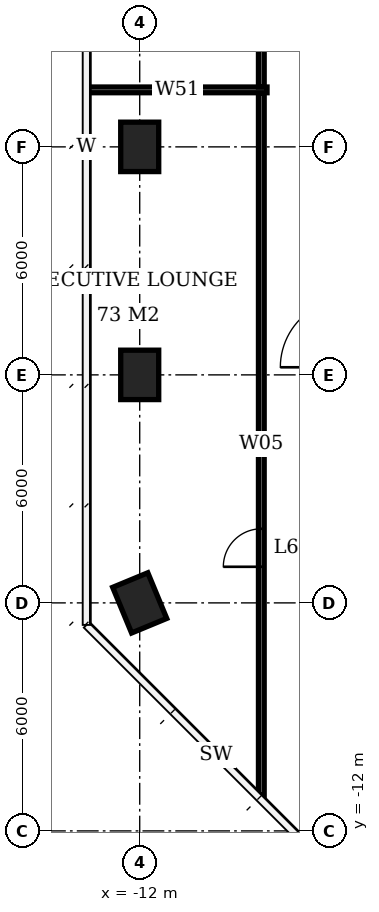
"""IFC4 building model, lengths in metres.
Left out: names, types, materials, properties, quantities, classifications, styles, units other than length and angle.
Written with IfcOpenShell. Run it as: python <this file> out.ifc"""

import sys

from ifc_helpers import new_model, si_unit, direction, frame, frame_2d, origin, origin_2d, place, context, subcontext, project, spatial, rectangle, extrude, element, fill, save


model = new_model("IFC4")
c1 = context("Model", 3, precision=1e-05, world=origin(), true_north=direction((0.0, 1.0)))
c2 = subcontext(c1, "Body", "Model", "MODEL_VIEW")
j1 = project(units=[si_unit("LENGTHUNIT", "METRE"), si_unit("PLANEANGLEUNIT", "RADIAN")], contexts=[c1])
p1 = place(None, origin())
s1 = spatial("IfcSite", under=j1, at=p1, CompositionType="ELEMENT")
p2 = place(p1, origin())
s2 = spatial("IfcBuilding", under=s1, at=p2, CompositionType="ELEMENT")
p3 = place(p2, frame((0.0, 0.0, 260.6)))
s3 = spatial("IfcBuildingStorey", under=s2, at=p3, CompositionType="ELEMENT", Elevation=260.6)
for number, where, z_axis, x_axis in (
    (1, (-12.0, -6.0, 0.0), (0.0, 0.0, 1.0), (-0.383, 0.924, 0.0)),
    (2, (-12.0, 0.0, 0.0), (0.0, 0.0, 1.0), (0.0, 1.0, 0.0)),
    (3, (-12.0, 6.0, 0.0), (0.0, 0.0, 1.0), (0.0, 1.0, 0.0)),
):
    element("IfcColumn", number, at=place(p3, frame(where, z_axis=z_axis, x_axis=x_axis)), inside=s3, PredefinedType="COLUMN", context=c2, shape_type="SweptSolid", body=[
        extrude(rectangle(XDim=1.3, YDim=1.0, at=origin_2d()), origin(), (0.0, 0.0, 1.0), 3.9),
    ])
p4 = place(p3, frame((-13.375, 7.5, 0.0), z_axis=(0.0, 0.0, 1.0), x_axis=(1.0, 0.0, 0.0)))
e4 = element("IfcWall", 4, at=p4, inside=s3, PredefinedType="PARTITIONING", context=c2, shape_type="SweptSolid", body=[
    extrude(rectangle(XDim=4.725, YDim=0.15, at=frame_2d((2.363, 0.0))), origin(), (0.0, 0.0, 1.0), 3.65),
])
p5 = place(p3, frame((-8.8, -11.063, 0.0), z_axis=(0.0, 0.0, 1.0), x_axis=(0.0, 1.0, 0.0)))
e5 = element("IfcWall", 5, at=p5, inside=s3, PredefinedType="PARTITIONING", context=c2, shape_type="SweptSolid", body=[
    extrude(rectangle(XDim=18.488, YDim=0.15, at=frame_2d((9.244, 0.0))), origin(), (0.0, 0.0, 1.0), 3.65),
])
p6 = place(p5, frame((6.013, 0.0, 0.0)))
e6 = element("IfcOpeningElement", 6, at=p6, cuts=e5, PredefinedType="OPENING", context=c2, shape_type="SweptSolid", body=[
    extrude(rectangle(XDim=1.0, YDim=2.4, at=frame_2d((0.5, 1.2))), frame((0.0, 0.085, 0.0), z_axis=(0.0, -1.0, 0.0), x_axis=(1.0, 0.0, 0.0)), (0.0, 0.0, 1.0), 0.17),
])
p7 = place(p3, frame((-8.8, 7.575, 0.0), z_axis=(0.0, 0.0, 1.0), x_axis=(0.0, 1.0, 0.0)))
e7 = element("IfcWall", 7, at=p7, inside=s3, PredefinedType="PARTITIONING", context=c2, shape_type="SweptSolid", body=[
    extrude(rectangle(XDim=15.488, YDim=0.15, at=frame_2d((7.744, 0.0))), origin(), (0.0, 0.0, 1.0), 3.65),
])
p8 = place(p7, frame((4.863, 0.0, 0.0)))
e8 = element("IfcOpeningElement", 8, at=p8, cuts=e7, PredefinedType="OPENING", context=c2, shape_type="SweptSolid", body=[
    extrude(rectangle(XDim=1.0, YDim=2.4, at=frame_2d((0.5, 1.2))), frame((0.0, 0.085, 0.0), z_axis=(0.0, -1.0, 0.0), x_axis=(1.0, 0.0, 0.0)), (0.0, 0.0, 1.0), 0.17),
])
p9 = place(p6, origin())
e9 = element("IfcDoor", 9, at=p9, inside=s3, OperationType="SINGLE_SWING_LEFT", PredefinedType="DOOR", context=c2, shape_type="SweptSolid", body=[
    extrude(rectangle(XDim=1.0, YDim=2.4, at=frame_2d((0.5, 1.2))), frame((0.0, 0.025, 0.0), z_axis=(0.0, -1.0, 0.0), x_axis=(1.0, 0.0, 0.0)), (0.0, 0.0, 1.0), 0.05),
])
fill(e6, e9)
save(model, sys.argv[1])
